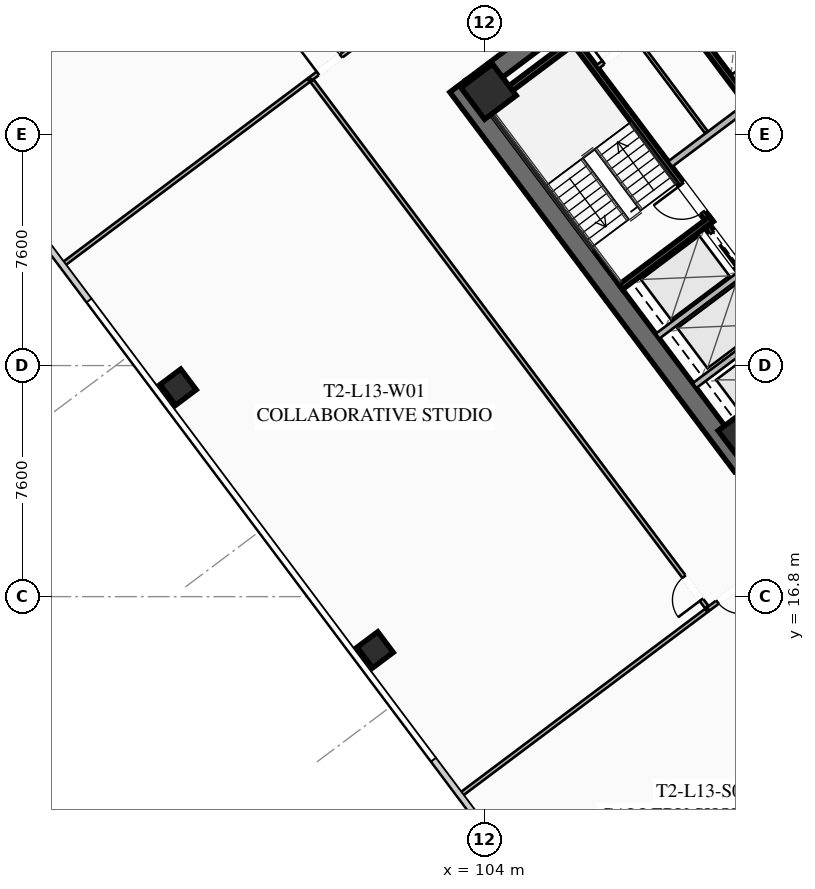
"""IFC4 building model, lengths in metres.
Left out: names, types, materials, properties, quantities, classifications, styles, units other than length and angle.
Written with IfcOpenShell. Run it as: python <this file> out.ifc"""

import sys

from ifc_helpers import new_model, si_unit, direction, frame, frame_2d, origin, origin_2d, place, context, subcontext, project, spatial, rectangle, hollow_rectangle, extrude, element, fill, save


model = new_model("IFC4")
c1 = context("Model", 3, precision=1e-05, world=origin(), true_north=direction((0.0, 1.0)))
c2 = subcontext(c1, "Body", "Model", "MODEL_VIEW")
j1 = project(units=[si_unit("LENGTHUNIT", "METRE"), si_unit("PLANEANGLEUNIT", "RADIAN")], contexts=[c1])
p1 = place(None, origin())
s1 = spatial("IfcSite", under=j1, at=p1, CompositionType="ELEMENT")
p2 = place(p1, origin())
s2 = spatial("IfcBuilding", under=s1, at=p2, CompositionType="ELEMENT")
p3 = place(p2, frame((0.0, 0.0, 53.0)))
s3 = spatial("IfcBuildingStorey", under=s2, at=p3, CompositionType="ELEMENT", Elevation=53.0)
p4 = place(p3, frame((112.476, 21.107, 0.0), z_axis=(0.0, 0.0, 1.0), x_axis=(-0.600005007985, 0.799996243986, 0.0)))
e1 = element("IfcWall", 1, at=p4, inside=s3, PredefinedType="SHEAR", context=c2, shape_type="SweptSolid", body=[
    extrude(rectangle(XDim=15.6, YDim=0.65, at=frame_2d((7.8, 0.0))), origin(), (0.0, 0.0, 1.0), 3.55),
])
p5 = place(p3, frame((103.571, 33.522, 0.0), z_axis=(0.0, 0.0, 1.0), x_axis=(0.799998028465, 0.600002628705, 0.0)))
e2 = element("IfcWall", 2, at=p5, inside=s3, PredefinedType="SHEAR", context=c2, shape_type="SweptSolid", body=[
    extrude(rectangle(XDim=14.86, YDim=0.65, at=frame_2d((7.43, 0.0))), origin(), (0.0, 0.0, 1.0), 3.55),
])
p6 = place(p5, frame((4.48, 0.0, 0.0)))
e3 = element("IfcOpeningElement", 3, at=p6, cuts=e2, PredefinedType="OPENING", context=c2, shape_type="SweptSolid", body=[
    extrude(rectangle(XDim=1.25, YDim=2.25, at=frame_2d((0.625, 1.125))), frame((0.0, 0.335, 0.0), z_axis=(0.0, -1.0, 0.0), x_axis=(1.0, 0.0, 0.0)), (0.0, 0.0, 1.0), 0.67),
])
p7 = place(p5, frame((9.53, 0.0, 0.0)))
e4 = element("IfcOpeningElement", 4, at=p7, cuts=e2, PredefinedType="OPENING", context=c2, shape_type="SweptSolid", body=[
    extrude(rectangle(XDim=1.25, YDim=2.25, at=frame_2d((0.625, 1.125))), frame((0.0, 0.335, 0.0), z_axis=(0.0, -1.0, 0.0), x_axis=(1.0, 0.0, 0.0)), (0.0, 0.0, 1.0), 0.67),
])
for number, where, z_axis, x_axis in (
    (5, (112.59, 22.13, 0.0), (0.0, 0.0, 1.0), (0.8, 0.6, 0.0)),
    (6, (104.13, 33.41, 0.0), (0.0, 0.0, 1.0), (0.8, 0.6, 0.0)),
):
    element("IfcColumn", number, at=place(p3, frame(where, z_axis=z_axis, x_axis=x_axis)), inside=s3, PredefinedType="COLUMN", context=c2, shape_type="SweptSolid", body=[
        extrude(hollow_rectangle(XDim=1.3, YDim=1.3, WallThickness=0.05, at=origin_2d()), origin(), (0.0, 0.0, 1.0), 3.35),
    ])
for number, where, z_axis, x_axis in (
    (7, (93.92, 23.69, 0.0), (0.0, 0.0, 1.0), (0.8, 0.6, 0.0)),
    (8, (100.4, 15.05, 0.0), (0.0, 0.0, 1.0), (0.8, 0.6, 0.0)),
):
    element("IfcColumn", number, at=place(p3, frame(where, z_axis=z_axis, x_axis=x_axis)), inside=s3, PredefinedType="COLUMN", context=c2, shape_type="SweptSolid", body=[
        extrude(hollow_rectangle(XDim=0.85, YDim=0.85, WallThickness=0.035, at=origin_2d()), origin(), (0.0, 0.0, 1.0), 3.35),
    ])
p8 = place(p3, frame((111.44, 29.08, 0.0), z_axis=(0.0, 0.0, 1.0), x_axis=(-0.600009827119, 0.799992629566, 0.0)))
e9 = element("IfcWall", 9, at=p8, inside=s3, PredefinedType="SHEAR", context=c2, shape_type="SweptSolid", body=[
    extrude(rectangle(XDim=7.95, YDim=0.2, at=frame_2d((3.975, 0.0))), origin(), (0.0, 0.0, 1.0), 3.35),
])
p9 = place(p8, frame((0.45, 0.0, 0.0)))
e10 = element("IfcOpeningElement", 10, at=p9, cuts=e9, PredefinedType="OPENING", context=c2, shape_type="SweptSolid", body=[
    extrude(rectangle(XDim=1.15, YDim=2.2, at=frame_2d((0.575, 1.1))), frame((0.0, 0.11, 0.0), z_axis=(0.0, -1.0, 0.0), x_axis=(1.0, 0.0, 0.0)), (0.0, 0.0, 1.0), 0.22),
])
for number, where, z_axis, x_axis in (
    (11, (108.476, 26.982, 0.0), (0.0, 0.0, 1.0), (0.8, 0.6, 0.0)),
    (12, (104.036, 32.902, 0.0), (0.0, 0.0, 1.0), (0.8, 0.6, 0.0)),
):
    element("IfcWall", number, at=place(p3, frame(where, z_axis=z_axis, x_axis=x_axis)), inside=s3, PredefinedType="SHEAR", context=c2, shape_type="SweptSolid", body=[
        extrude(rectangle(XDim=3.73, YDim=0.2, at=frame_2d((1.865, 0.0))), origin(), (0.0, 0.0, 1.0), 3.35),
    ])
p10 = place(p3, frame((117.938, 26.016, 0.0), z_axis=(0.0, 0.0, 1.0), x_axis=(-0.600005463273, 0.799995902516, 0.0)))
e13 = element("IfcWall", 13, at=p10, inside=s3, PredefinedType="SHEAR", context=c2, shape_type="SweptSolid", body=[
    extrude(rectangle(XDim=14.3, YDim=0.2, at=frame_2d((7.15, 0.0))), origin(), (0.0, 0.0, 1.0), 3.35),
])
p11 = place(p3, frame((110.104, 31.028, 0.0), z_axis=(0.0, 0.0, 1.0), x_axis=(0.800018601094, 0.59997519774, 0.0)))
e14 = element("IfcWall", 14, at=p11, inside=s3, PredefinedType="SOLIDWALL", context=c2, shape_type="SweptSolid", body=[
    extrude(rectangle(XDim=3.15, YDim=0.22, at=frame_2d((1.575, 0.0))), origin(), (0.0, 0.0, 1.0), 2.703),
])
p12 = place(p3, frame((115.13, 23.91, 0.0), z_axis=(0.0, 0.0, 1.0), x_axis=(-0.599975393228, 0.800018454488, 0.0)))
e15 = element("IfcWall", 15, at=p12, inside=s3, PredefinedType="SHEAR", context=c2, shape_type="SweptSolid", body=[
    extrude(rectangle(XDim=6.35, YDim=0.2, at=frame_2d((3.175, 0.0))), origin(), (0.0, 0.0, 1.0), 3.35),
])
p13 = place(p12, frame((4.775, 0.0, 0.0)))
e16 = element("IfcOpeningElement", 16, at=p13, cuts=e15, PredefinedType="OPENING", context=c2, shape_type="SweptSolid", body=[
    extrude(rectangle(XDim=1.3, YDim=2.25, at=frame_2d((0.65, 1.125))), frame((0.0, 0.11, 0.0), z_axis=(0.0, -1.0, 0.0), x_axis=(1.0, 0.0, 0.0)), (0.0, 0.0, 1.0), 0.22),
])
p14 = place(p12, frame((2.775, 0.0, 0.0)))
e17 = element("IfcOpeningElement", 17, at=p14, cuts=e15, PredefinedType="OPENING", context=c2, shape_type="SweptSolid", body=[
    extrude(rectangle(XDim=1.3, YDim=2.25, at=frame_2d((0.65, 1.125))), frame((0.0, 0.11, 0.0), z_axis=(0.0, -1.0, 0.0), x_axis=(1.0, 0.0, 0.0)), (0.0, 0.0, 1.0), 0.22),
])
p15 = place(p12, frame((0.575, 0.0, 0.0)))
e18 = element("IfcOpeningElement", 18, at=p15, cuts=e15, PredefinedType="OPENING", context=c2, shape_type="SweptSolid", body=[
    extrude(rectangle(XDim=1.3, YDim=2.25, at=frame_2d((0.65, 1.125))), frame((0.0, 0.11, 0.0), z_axis=(0.0, -1.0, 0.0), x_axis=(1.0, 0.0, 0.0)), (0.0, 0.0, 1.0), 0.22),
])
for number, where, z_axis, x_axis in (
    (19, (110.906, 23.742, 0.0), (0.0, 0.0, 1.0), (0.8, 0.6, 0.0)),
    (20, (109.688, 25.366, 0.0), (0.0, 0.0, 1.0), (0.8, 0.6, 0.0)),
):
    element("IfcWall", number, at=place(p3, frame(where, z_axis=z_axis, x_axis=x_axis)), inside=s3, PredefinedType="SOLIDWALL", context=c2, shape_type="SweptSolid", body=[
        extrude(rectangle(XDim=3.38, YDim=0.2, at=frame_2d((1.69, 0.0))), origin(), (0.0, 0.0, 1.0), 3.35),
    ])
p16 = place(p3, frame((107.71, 34.22, 0.0), z_axis=(0.0, 0.0, 1.0), x_axis=(0.799981399002, 0.60002480053, 0.0)))
e21 = element("IfcWall", 21, at=p16, inside=s3, PredefinedType="PARTITIONING", context=c2, shape_type="SweptSolid", body=[
    extrude(rectangle(XDim=3.15, YDim=0.135, at=frame_2d((1.575, 0.0))), origin(), (0.0, 0.0, 1.0), 2.703),
])
p17 = place(p16, frame((0.25, 0.0, 0.0)))
e22 = element("IfcOpeningElement", 22, at=p17, cuts=e21, PredefinedType="OPENING", context=c2, shape_type="SweptSolid", body=[
    extrude(rectangle(XDim=0.95, YDim=2.05, at=frame_2d((0.475, 1.025))), frame((0.0, 0.077, 0.0), z_axis=(0.0, -1.0, 0.0), x_axis=(1.0, 0.0, 0.0)), (0.0, 0.0, 1.0), 0.155),
])
p18 = place(p16, frame((1.95, 0.0, 0.0)))
e23 = element("IfcOpeningElement", 23, at=p18, cuts=e21, PredefinedType="OPENING", context=c2, shape_type="SweptSolid", body=[
    extrude(rectangle(XDim=0.95, YDim=2.05, at=frame_2d((0.475, 1.025))), frame((0.0, 0.077, 0.0), z_axis=(0.0, -1.0, 0.0), x_axis=(1.0, 0.0, 0.0)), (0.0, 0.0, 1.0), 0.155),
])
p19 = place(p3, frame((111.296, 32.072, 0.0), z_axis=(0.0, 0.0, 1.0), x_axis=(-0.59995887973, 0.800030838552, 0.0)))
e24 = element("IfcWall", 24, at=p19, inside=s3, PredefinedType="PARTITIONING", context=c2, shape_type="SweptSolid", body=[
    extrude(rectangle(XDim=3.8, YDim=0.11, at=frame_2d((1.9, 0.0))), origin(), (0.0, 0.0, 1.0), 2.703),
])
p20 = place(p3, frame((115.11, 33.27, 0.0), z_axis=(0.0, 0.0, 1.0), x_axis=(-0.600011488909, 0.79999138319, 0.0)))
e25 = element("IfcWall", 25, at=p20, inside=s3, PredefinedType="SOLIDWALL", context=c2, shape_type="SweptSolid", body=[
    extrude(rectangle(XDim=6.8, YDim=0.2, at=frame_2d((3.4, 0.0))), origin(), (0.0, 0.0, 1.0), 3.35),
])
p21 = place(p3, frame((112.176, 33.882, 0.0), z_axis=(0.0, 0.0, 1.0), x_axis=(0.8, 0.6, 0.0)))
e26 = element("IfcWall", 26, at=p21, inside=s3, PredefinedType="SOLIDWALL", context=c2, shape_type="SweptSolid", body=[
    extrude(rectangle(XDim=1.88, YDim=0.2, at=frame_2d((0.94, 0.0))), origin(), (0.0, 0.0, 1.0), 3.35),
])
p22 = place(p3, frame((98.276, 33.832, 0.0), z_axis=(0.0, 0.0, 1.0), x_axis=(0.800001944698, 0.59999740706, 0.0)))
e27 = element("IfcWall", 27, at=p22, inside=s3, PredefinedType="PARTITIONING", context=c2, shape_type="SweptSolid", body=[
    extrude(rectangle(XDim=30.13, YDim=0.135, at=frame_2d((15.065, 0.0))), origin(), (0.0, 0.0, 1.0), 2.703),
])
p23 = place(p22, frame((0.3, 0.0, 0.0)))
e28 = element("IfcOpeningElement", 28, at=p23, cuts=e27, PredefinedType="OPENING", context=c2, shape_type="SweptSolid", body=[
    extrude(rectangle(XDim=0.95, YDim=2.05, at=frame_2d((0.475, 1.025))), frame((0.0, 0.077, 0.0), z_axis=(0.0, -1.0, 0.0), x_axis=(1.0, 0.0, 0.0)), (0.0, 0.0, 1.0), 0.155),
])
p24 = place(p22, frame((10.95, 0.0, 0.0)))
e29 = element("IfcOpeningElement", 29, at=p24, cuts=e27, PredefinedType="OPENING", context=c2, shape_type="SweptSolid", body=[
    extrude(rectangle(XDim=0.95, YDim=2.05, at=frame_2d((0.475, 1.025))), frame((0.0, 0.077, 0.0), z_axis=(0.0, -1.0, 0.0), x_axis=(1.0, 0.0, 0.0)), (0.0, 0.0, 1.0), 0.155),
])
p25 = place(p22, frame((14.95, 0.0, 0.0)))
e30 = element("IfcOpeningElement", 30, at=p25, cuts=e27, PredefinedType="OPENING", context=c2, shape_type="SweptSolid", body=[
    extrude(rectangle(XDim=0.95, YDim=2.05, at=frame_2d((0.475, 1.025))), frame((0.0, 0.077, 0.0), z_axis=(0.0, -1.0, 0.0), x_axis=(1.0, 0.0, 0.0)), (0.0, 0.0, 1.0), 0.155),
])
p26 = place(p22, frame((28.88, 0.0, 0.0)))
e31 = element("IfcOpeningElement", 31, at=p26, cuts=e27, PredefinedType="OPENING", context=c2, shape_type="SweptSolid", body=[
    extrude(rectangle(XDim=0.95, YDim=2.05, at=frame_2d((0.475, 1.025))), frame((0.0, 0.077, 0.0), z_axis=(0.0, -1.0, 0.0), x_axis=(1.0, 0.0, 0.0)), (0.0, 0.0, 1.0), 0.155),
])
p27 = place(p3, frame((135.46, 34.47, 0.0), z_axis=(0.0, 0.0, 1.0), x_axis=(-0.800001944698, -0.59999740706, 0.0)))
e32 = element("IfcWall", 32, at=p27, inside=s3, PredefinedType="PARTITIONING", context=c2, shape_type="SweptSolid", body=[
    extrude(rectangle(XDim=30.13, YDim=0.135, at=frame_2d((15.065, 0.0))), origin(), (0.0, 0.0, 1.0), 2.703),
])
p28 = place(p27, frame((28.8, 0.0, 0.0)))
e33 = element("IfcOpeningElement", 33, at=p28, cuts=e32, PredefinedType="OPENING", context=c2, shape_type="SweptSolid", body=[
    extrude(rectangle(XDim=0.95, YDim=2.05, at=frame_2d((0.475, 1.025))), frame((0.0, 0.077, 0.0), z_axis=(0.0, -1.0, 0.0), x_axis=(1.0, 0.0, 0.0)), (0.0, 0.0, 1.0), 0.155),
])
p29 = place(p27, frame((17.921, 0.0, 0.0)))
e34 = element("IfcOpeningElement", 34, at=p29, cuts=e32, PredefinedType="OPENING", context=c2, shape_type="SweptSolid", body=[
    extrude(rectangle(XDim=0.95, YDim=2.05, at=frame_2d((0.475, 1.025))), frame((0.0, 0.077, 0.0), z_axis=(0.0, -1.0, 0.0), x_axis=(1.0, 0.0, 0.0)), (0.0, 0.0, 1.0), 0.155),
])
p30 = place(p27, frame((14.129, 0.0, 0.0)))
e35 = element("IfcOpeningElement", 35, at=p30, cuts=e32, PredefinedType="OPENING", context=c2, shape_type="SweptSolid", body=[
    extrude(rectangle(XDim=0.95, YDim=2.05, at=frame_2d((0.475, 1.025))), frame((0.0, 0.077, 0.0), z_axis=(0.0, -1.0, 0.0), x_axis=(1.0, 0.0, 0.0)), (0.0, 0.0, 1.0), 0.155),
])
p31 = place(p27, frame((0.38, 0.0, 0.0)))
e36 = element("IfcOpeningElement", 36, at=p31, cuts=e32, PredefinedType="OPENING", context=c2, shape_type="SweptSolid", body=[
    extrude(rectangle(XDim=0.95, YDim=2.05, at=frame_2d((0.475, 1.025))), frame((0.0, 0.077, 0.0), z_axis=(0.0, -1.0, 0.0), x_axis=(1.0, 0.0, 0.0)), (0.0, 0.0, 1.0), 0.155),
])
p32 = place(p3, frame((111.308, 16.456, 0.0), z_axis=(0.0, 0.0, 1.0), x_axis=(-0.600003610192, 0.799997292343, 0.0)))
e37 = element("IfcWall", 37, at=p32, inside=s3, PredefinedType="PARTITIONING", context=c2, shape_type="SweptSolid", body=[
    extrude(rectangle(XDim=21.64, YDim=0.135, at=frame_2d((10.82, 0.0))), origin(), (0.0, 0.0, 1.0), 2.703),
])
p33 = place(p32, frame((0.3, 0.0, 0.0)))
e38 = element("IfcOpeningElement", 38, at=p33, cuts=e37, PredefinedType="OPENING", context=c2, shape_type="SweptSolid", body=[
    extrude(rectangle(XDim=0.95, YDim=2.05, at=frame_2d((0.475, 1.025))), frame((0.0, 0.077, 0.0), z_axis=(0.0, -1.0, 0.0), x_axis=(1.0, 0.0, 0.0)), (0.0, 0.0, 1.0), 0.155),
])
for number, where, z_axis, x_axis in (
    (39, (98.212, 33.784, 0.0), (0.0, 0.0, 1.0), (-0.8, -0.6, 0.0)),
    (40, (103.196, 10.272, 0.0), (0.0, 0.0, 1.0), (0.8, 0.6, 0.0)),
):
    element("IfcWall", number, at=place(p3, frame(where, z_axis=z_axis, x_axis=x_axis)), inside=s3, PredefinedType="PARTITIONING", context=c2, shape_type="SweptSolid", body=[
        extrude(rectangle(XDim=10.12, YDim=0.135, at=frame_2d((5.06, 0.0))), origin(), (0.0, 0.0, 1.0), 2.703),
    ])
p34 = place(p9, origin())
e41 = element("IfcDoor", 41, at=p34, inside=s3, OperationType="SINGLE_SWING_RIGHT", PredefinedType="DOOR", context=c2, shape_type="SweptSolid", body=[
    extrude(rectangle(XDim=1.15, YDim=2.2, at=frame_2d((0.575, 1.1))), frame((0.0, 0.025, 0.0), z_axis=(0.0, -1.0, 0.0), x_axis=(1.0, 0.0, 0.0)), (0.0, 0.0, 1.0), 0.05),
])
fill(e10, e41)
p35 = place(p17, origin())
e42 = element("IfcDoor", 42, at=p35, inside=s3, OperationType="SINGLE_SWING_LEFT", PredefinedType="DOOR", context=c2, shape_type="SweptSolid", body=[
    extrude(rectangle(XDim=0.95, YDim=2.05, at=frame_2d((0.475, 1.025))), frame((0.0, 0.025, 0.0), z_axis=(0.0, -1.0, 0.0), x_axis=(1.0, 0.0, 0.0)), (0.0, 0.0, 1.0), 0.05),
])
fill(e22, e42)
p36 = place(p23, origin())
e43 = element("IfcDoor", 43, at=p36, inside=s3, OperationType="SINGLE_SWING_LEFT", PredefinedType="DOOR", context=c2, shape_type="SweptSolid", body=[
    extrude(rectangle(XDim=0.95, YDim=2.05, at=frame_2d((0.475, 1.025))), frame((0.0, 0.025, 0.0), z_axis=(0.0, -1.0, 0.0), x_axis=(1.0, 0.0, 0.0)), (0.0, 0.0, 1.0), 0.05),
])
fill(e28, e43)
p37 = place(p28, origin())
e44 = element("IfcDoor", 44, at=p37, inside=s3, OperationType="SINGLE_SWING_LEFT", PredefinedType="DOOR", context=c2, shape_type="SweptSolid", body=[
    extrude(rectangle(XDim=0.95, YDim=2.05, at=frame_2d((0.475, 1.025))), frame((0.0, 0.025, 0.0), z_axis=(0.0, -1.0, 0.0), x_axis=(1.0, 0.0, 0.0)), (0.0, 0.0, 1.0), 0.05),
])
fill(e33, e44)
p38 = place(p33, origin())
e45 = element("IfcDoor", 45, at=p38, inside=s3, OperationType="SINGLE_SWING_LEFT", PredefinedType="DOOR", context=c2, shape_type="SweptSolid", body=[
    extrude(rectangle(XDim=0.95, YDim=2.05, at=frame_2d((0.475, 1.025))), frame((0.0, 0.025, 0.0), z_axis=(0.0, -1.0, 0.0), x_axis=(1.0, 0.0, 0.0)), (0.0, 0.0, 1.0), 0.05),
])
fill(e38, e45)
p39 = place(p13, origin())
e46 = element("IfcDoor", 46, at=p39, inside=s3, OperationType="SLIDING_TO_LEFT", PredefinedType="DOOR", context=c2, shape_type="SweptSolid", body=[
    extrude(rectangle(XDim=1.3, YDim=2.25, at=frame_2d((0.65, 1.125))), frame((0.0, 0.025, 0.0), z_axis=(0.0, -1.0, 0.0), x_axis=(1.0, 0.0, 0.0)), (0.0, 0.0, 1.0), 0.05),
])
fill(e16, e46)
save(model, sys.argv[1])
